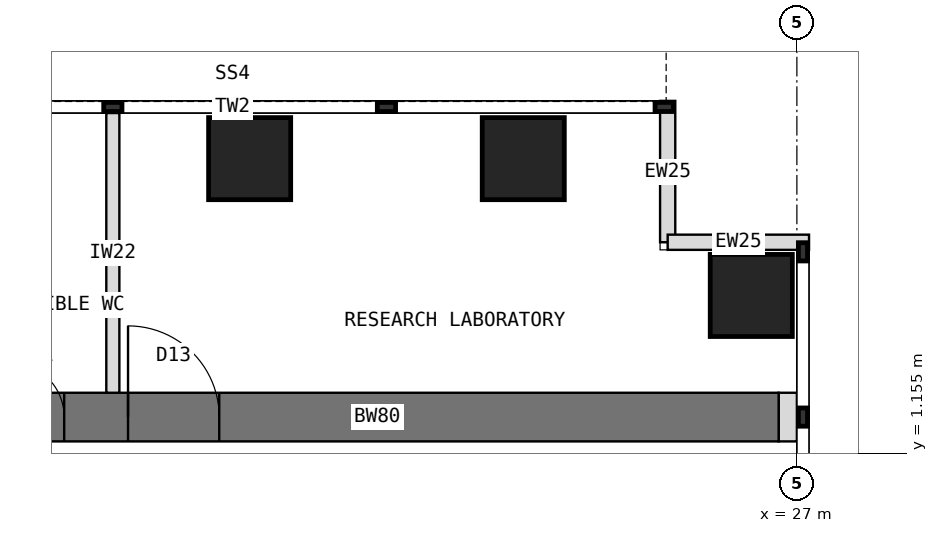
"""IFC4 building model, lengths in metres.
Left out: names, types, materials, properties, quantities, classifications, styles, units other than length and angle.
Written with IfcOpenShell. Run it as: python <this file> out.ifc"""

import sys

from ifc_helpers import new_model, si_unit, direction, frame, frame_2d, origin, origin_2d, place, context, subcontext, project, spatial, rectangle, extrude, element, fill, save


model = new_model("IFC4")
c1 = context("Model", 3, precision=1e-05, world=origin(), true_north=direction((0.0, 1.0)))
c2 = subcontext(c1, "Body", "Model", "MODEL_VIEW")
j1 = project(units=[si_unit("LENGTHUNIT", "METRE"), si_unit("PLANEANGLEUNIT", "RADIAN")], contexts=[c1])
p1 = place(None, origin())
s1 = spatial("IfcSite", under=j1, at=p1, CompositionType="ELEMENT")
p2 = place(p1, origin())
s2 = spatial("IfcBuilding", under=s1, at=p2, CompositionType="ELEMENT")
p3 = place(p2, frame((0.0, 0.0, 101.5)))
s3 = spatial("IfcBuildingStorey", under=s2, at=p3, CompositionType="ELEMENT", Elevation=101.5)
p4 = place(p3, frame((13.5, 1.75, 0.0), z_axis=(0.0, 0.0, 1.0), x_axis=(1.0, 0.0, 0.0)))
e1 = element("IfcWall", 1, at=p4, inside=s3, PredefinedType="SHEAR", context=c2, shape_type="SweptSolid", body=[
    extrude(rectangle(XDim=13.2, YDim=0.8, at=frame_2d((6.6, 0.0))), origin(), (0.0, 0.0, 1.0), 4.0),
])
p5 = place(p4, frame((0.55, 0.0, 0.0)))
e2 = element("IfcOpeningElement", 2, at=p5, cuts=e1, PredefinedType="OPENING", context=c2, shape_type="SweptSolid", body=[
    extrude(rectangle(XDim=0.9, YDim=2.1, at=frame_2d((0.45, 1.05))), frame((0.0, 0.41, 0.0), z_axis=(0.0, -1.0, 0.0), x_axis=(1.0, 0.0, 0.0)), (0.0, 0.0, 1.0), 0.82),
])
p6 = place(p4, frame((2.5, 0.0, 0.0)))
e3 = element("IfcOpeningElement", 3, at=p6, cuts=e1, PredefinedType="OPENING", context=c2, shape_type="SweptSolid", body=[
    extrude(rectangle(XDim=1.5, YDim=2.1, at=frame_2d((0.75, 1.05))), frame((0.0, 0.41, 0.0), z_axis=(0.0, -1.0, 0.0), x_axis=(1.0, 0.0, 0.0)), (0.0, 0.0, 1.0), 0.82),
])
for number, where, z_axis, x_axis in (
    (4, (18.0, 6.0, 0.0), (0.0, 0.0, 1.0), (1.0, 0.0, 0.0)),
    (5, (22.5, 6.0, 0.0), (0.0, 0.0, 1.0), (1.0, 0.0, 0.0)),
    (6, (26.25, 3.75, 0.0), (0.0, 0.0, 1.0), (1.0, 0.0, 0.0)),
):
    element("IfcColumn", number, at=place(p3, frame(where, z_axis=z_axis, x_axis=x_axis)), inside=s3, PredefinedType="COLUMN", context=c2, shape_type="SweptSolid", body=[
        extrude(rectangle(XDim=1.35, YDim=1.35, at=origin_2d()), origin(), (0.0, 0.0, 1.0), 4.0),
    ])
for number, where, z_axis, x_axis in (
    (7, (24.875, 6.95, 0.0), (0.0, 0.0, 1.0), (0.0, -1.0, 0.0)),
    (8, (24.875, 4.625, 0.0), (0.0, 0.0, 1.0), (1.0, 0.0, 0.0)),
):
    element("IfcWall", number, at=place(p3, frame(where, z_axis=z_axis, x_axis=x_axis)), inside=s3, PredefinedType="STANDARD", context=c2, shape_type="SweptSolid", body=[
        extrude(rectangle(XDim=2.325, YDim=0.25, at=frame_2d((1.163, 0.0))), origin(), (0.0, 0.0, 1.0), 3.8),
    ])
p7 = place(p3, frame((26.7, 1.75, 0.0), z_axis=(0.0, 0.0, 1.0), x_axis=(1.0, 0.0, 0.0)))
e9 = element("IfcWall", 9, at=p7, inside=s3, PredefinedType="PARTITIONING", context=c2, shape_type="SweptSolid", body=[
    extrude(rectangle(XDim=0.3, YDim=0.8, at=frame_2d((0.15, 0.0))), origin(), (0.0, 0.0, 1.0), 3.8),
])
p8 = place(p3, frame((15.75, 2.15, 0.0), z_axis=(0.0, 0.0, 1.0), x_axis=(0.0, 1.0, 0.0)))
e10 = element("IfcWall", 10, at=p8, inside=s3, PredefinedType="PARTITIONING", context=c2, shape_type="SweptSolid", body=[
    extrude(rectangle(XDim=4.6, YDim=0.215, at=frame_2d((2.3, 0.0))), origin(), (0.0, 0.0, 1.0), 3.8),
])
p9 = place(p5, origin())
e11 = element("IfcDoor", 11, at=p9, inside=s3, OperationType="SINGLE_SWING_LEFT", PredefinedType="DOOR", context=c2, shape_type="SweptSolid", body=[
    extrude(rectangle(XDim=0.82, YDim=2.06, at=frame_2d((0.45, 1.03))), frame((0.0, 0.025, 0.0), z_axis=(0.0, -1.0, 0.0), x_axis=(1.0, 0.0, 0.0)), (0.0, 0.0, 1.0), 0.05),
    extrude(rectangle(XDim=0.04, YDim=2.1, at=frame_2d((0.02, 1.05))), frame((0.0, 0.4, 0.0), z_axis=(0.0, -1.0, 0.0), x_axis=(1.0, 0.0, 0.0)), (0.0, 0.0, 1.0), 0.8),
    extrude(rectangle(XDim=0.04, YDim=2.1, at=frame_2d((0.88, 1.05))), frame((0.0, 0.4, 0.0), z_axis=(0.0, -1.0, 0.0), x_axis=(1.0, 0.0, 0.0)), (0.0, 0.0, 1.0), 0.8),
    extrude(rectangle(XDim=0.82, YDim=0.04, at=frame_2d((0.45, 2.08))), frame((0.0, 0.4, 0.0), z_axis=(0.0, -1.0, 0.0), x_axis=(1.0, 0.0, 0.0)), (0.0, 0.0, 1.0), 0.8),
])
fill(e2, e11)
p10 = place(p6, origin())
e12 = element("IfcDoor", 12, at=p10, inside=s3, OperationType="DOUBLE_DOOR_SINGLE_SWING", PredefinedType="DOOR", context=c2, shape_type="SweptSolid", body=[
    extrude(rectangle(XDim=1.42, YDim=2.06, at=frame_2d((0.75, 1.03))), frame((0.0, 0.025, 0.0), z_axis=(0.0, -1.0, 0.0), x_axis=(1.0, 0.0, 0.0)), (0.0, 0.0, 1.0), 0.05),
    extrude(rectangle(XDim=0.04, YDim=2.1, at=frame_2d((0.02, 1.05))), frame((0.0, 0.4, 0.0), z_axis=(0.0, -1.0, 0.0), x_axis=(1.0, 0.0, 0.0)), (0.0, 0.0, 1.0), 0.8),
    extrude(rectangle(XDim=0.04, YDim=2.1, at=frame_2d((1.48, 1.05))), frame((0.0, 0.4, 0.0), z_axis=(0.0, -1.0, 0.0), x_axis=(1.0, 0.0, 0.0)), (0.0, 0.0, 1.0), 0.8),
    extrude(rectangle(XDim=1.42, YDim=0.04, at=frame_2d((0.75, 2.08))), frame((0.0, 0.4, 0.0), z_axis=(0.0, -1.0, 0.0), x_axis=(1.0, 0.0, 0.0)), (0.0, 0.0, 1.0), 0.8),
])
fill(e3, e12)
save(model, sys.argv[1])
